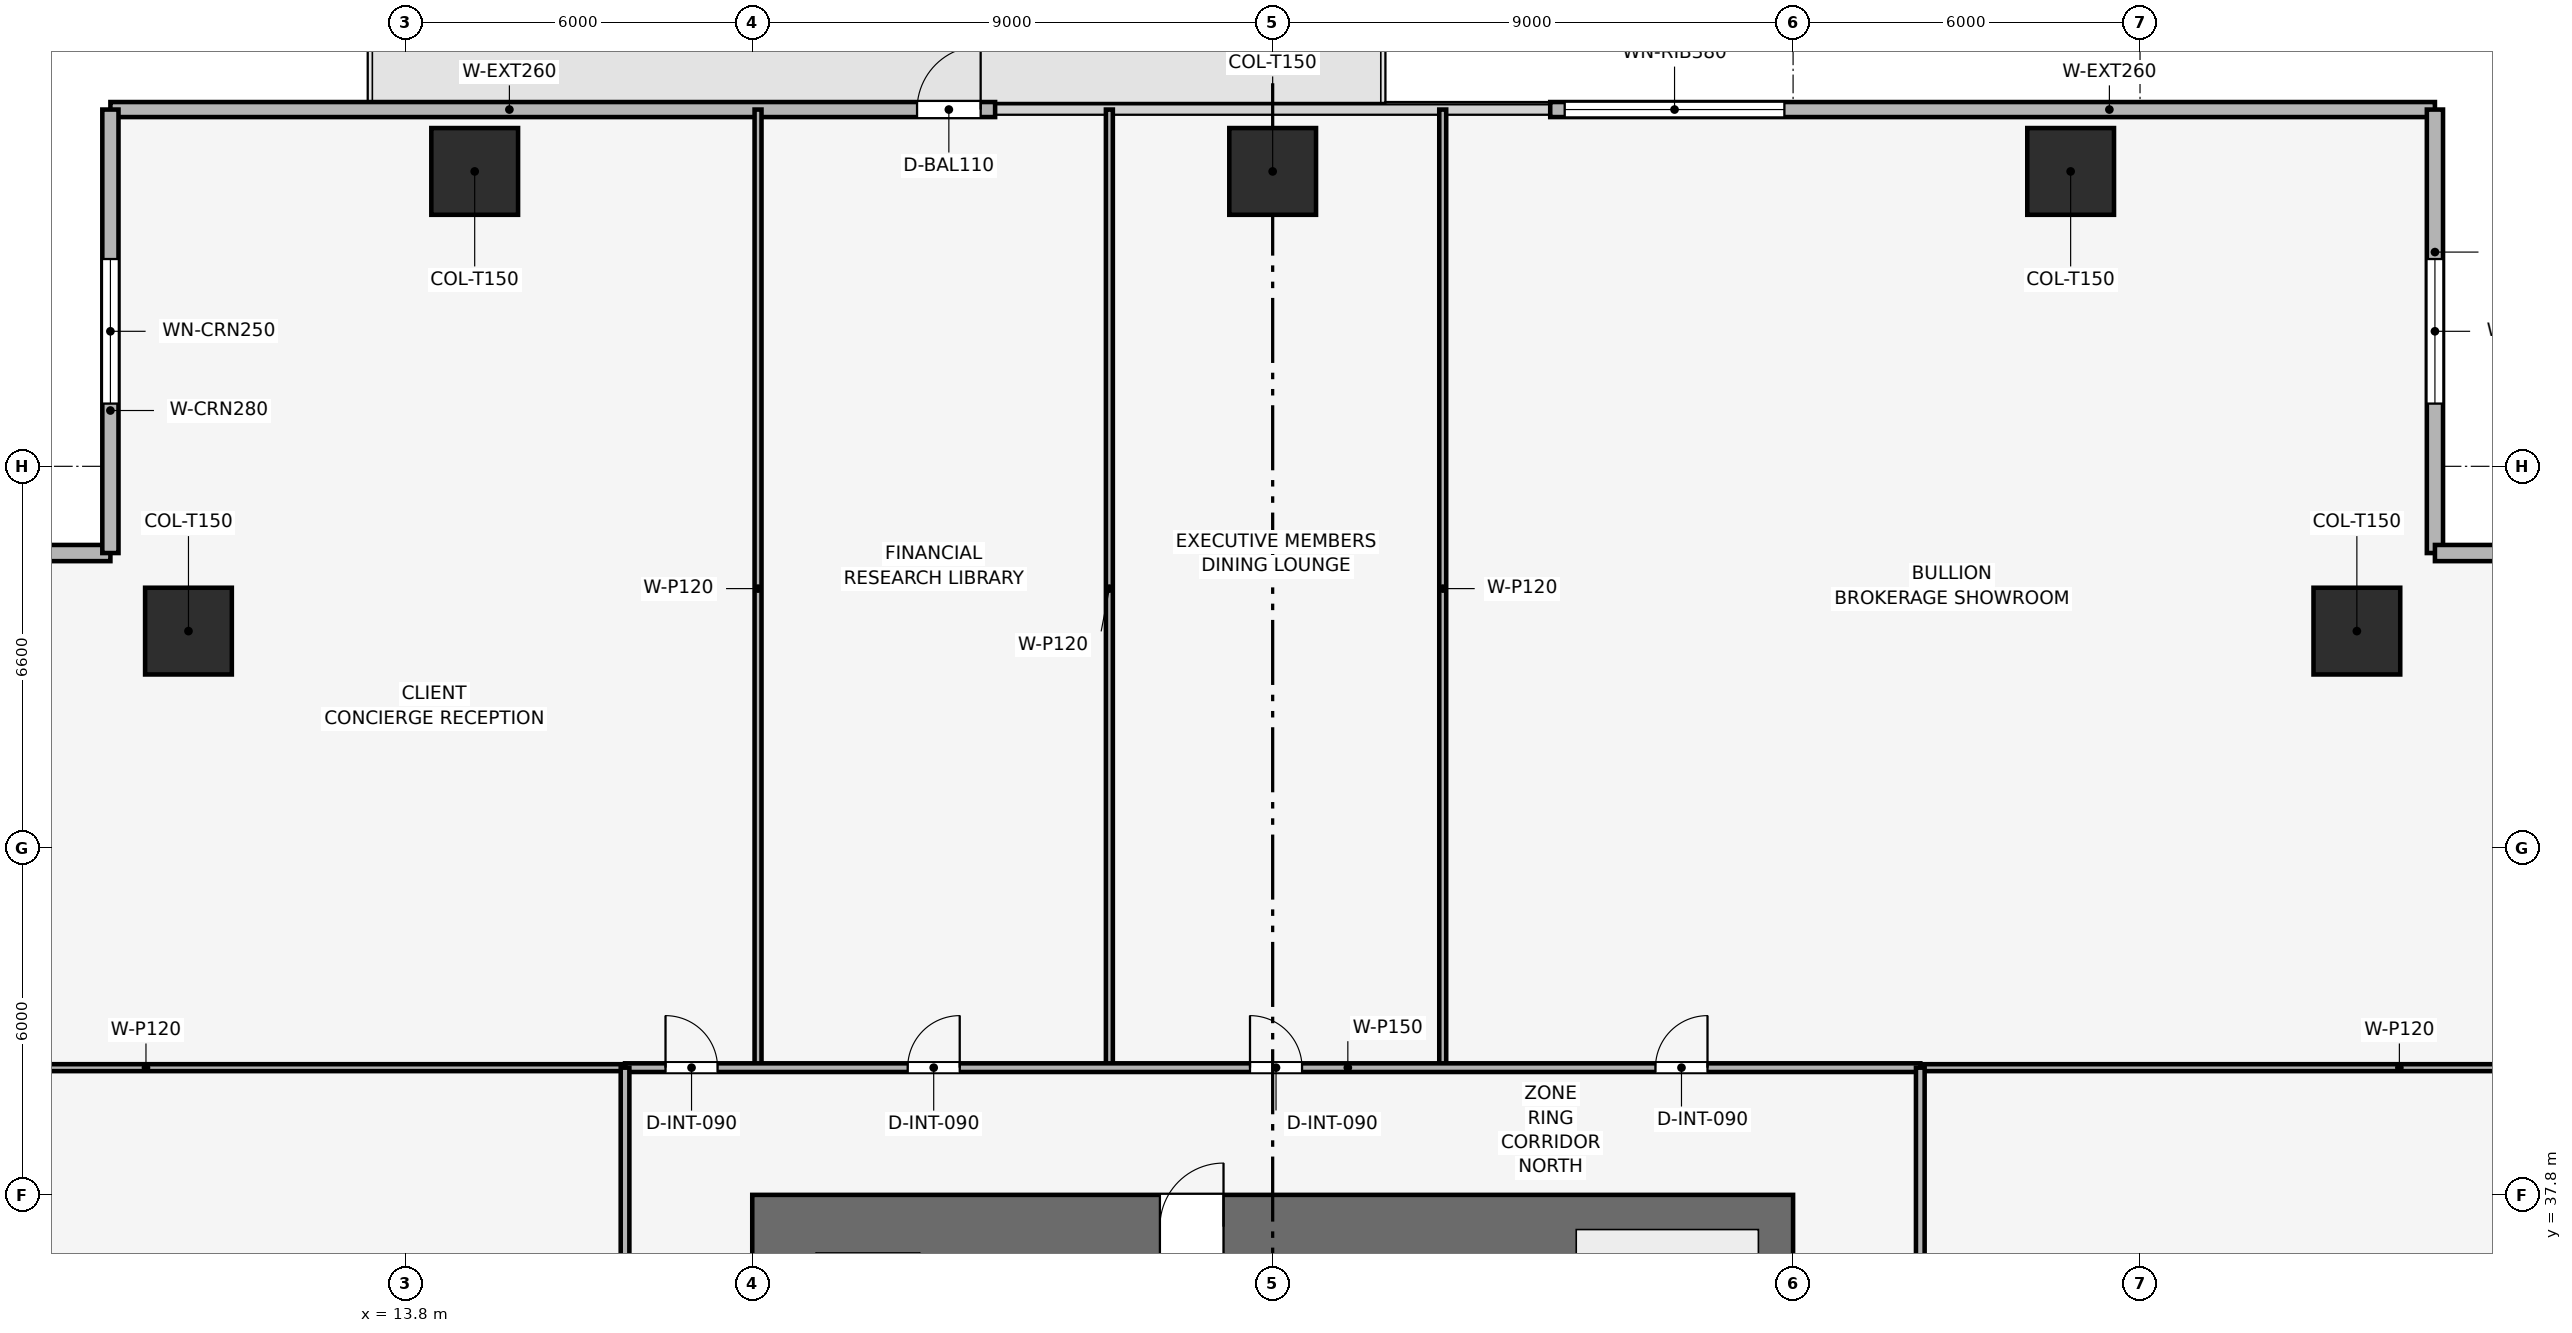
"""IFC4 building model, lengths in metres.
Left out: names, types, materials, properties, quantities, classifications, styles, units other than length and angle.
Written with IfcOpenShell. Run it as: python <this file> out.ifc"""

import sys

from ifc_helpers import new_model, si_unit, direction, frame, frame_2d, origin, origin_2d, place, context, subcontext, project, spatial, rectangle, extrude, element, fill, save


model = new_model("IFC4")
c1 = context("Model", 3, precision=1e-05, world=origin(), true_north=direction((0.0, 1.0)))
c2 = subcontext(c1, "Body", "Model", "MODEL_VIEW")
j1 = project(units=[si_unit("LENGTHUNIT", "METRE"), si_unit("PLANEANGLEUNIT", "RADIAN")], contexts=[c1])
p1 = place(None, origin())
s1 = spatial("IfcSite", under=j1, at=p1, CompositionType="ELEMENT")
p2 = place(p1, origin())
s2 = spatial("IfcBuilding", under=s1, at=p2, CompositionType="ELEMENT")
p3 = place(p2, frame((0.0, 0.0, 33.9)))
s3 = spatial("IfcBuildingStorey", under=s2, at=p3, CompositionType="ELEMENT", Elevation=33.9)
p4 = place(p3, frame((19.8, 37.25, 0.0), z_axis=(0.0, 0.0, 1.0), x_axis=(1.0, 0.0, 0.0)))
e1 = element("IfcWall", 1, at=p4, inside=s3, PredefinedType="SHEAR", context=c2, shape_type="SweptSolid", body=[
    extrude(rectangle(XDim=18.0, YDim=1.1, at=frame_2d((9.0, 0.0))), origin(), (0.0, 0.0, 1.0), 3.9),
])
p5 = place(p4, frame((7.05, 0.0, 0.0)))
e2 = element("IfcOpeningElement", 2, at=p5, cuts=e1, PredefinedType="OPENING", context=c2, shape_type="SweptSolid", body=[
    extrude(rectangle(XDim=1.1, YDim=2.15, at=frame_2d((0.55, 1.075))), frame((0.0, 0.56, 0.0), z_axis=(0.0, -1.0, 0.0), x_axis=(1.0, 0.0, 0.0)), (0.0, 0.0, 1.0), 1.12),
])
for number, where, z_axis, x_axis in (
    (3, (42.6, 55.5, 0.003), (0.0, 0.0, 1.0), (1.0, 0.0, 0.0)),
    (4, (28.8, 55.5, 0.003), (0.0, 0.0, 1.0), (1.0, 0.0, 0.0)),
    (5, (15.0, 55.5, 0.003), (0.0, 0.0, 1.0), (1.0, 0.0, 0.0)),
    (6, (47.55, 47.55, 0.003), (0.0, 0.0, 1.0), (1.0, 0.0, 0.0)),
    (7, (10.05, 47.55, 0.003), (0.0, 0.0, 1.0), (1.0, 0.0, 0.0)),
):
    element("IfcColumn", number, at=place(p3, frame(where, z_axis=z_axis, x_axis=x_axis)), inside=s3, PredefinedType="COLUMN", context=c2, shape_type="SweptSolid", body=[
        extrude(rectangle(XDim=1.5, YDim=1.5, at=origin_2d()), origin(), (0.0, 0.0, 1.0), 3.644),
    ])
p6 = place(p3, frame((8.7, 56.57, 0.0), z_axis=(0.0, 0.0, 1.0), x_axis=(1.0, 0.0, 0.0)))
e8 = element("IfcWall", 8, at=p6, inside=s3, PredefinedType="SOLIDWALL", context=c2, shape_type="SweptSolid", body=[
    extrude(rectangle(XDim=15.3, YDim=0.26, at=frame_2d((7.65, 0.0))), origin(), (0.0, 0.0, 1.0), 3.65),
])
p7 = place(p6, frame((13.95, 0.0, 0.0)))
e9 = element("IfcOpeningElement", 9, at=p7, cuts=e8, PredefinedType="OPENING", context=c2, shape_type="SweptSolid", body=[
    extrude(rectangle(XDim=1.1, YDim=2.2, at=frame_2d((0.55, 1.1))), frame((0.0, 0.14, 0.0), z_axis=(0.0, -1.0, 0.0), x_axis=(1.0, 0.0, 0.0)), (0.0, 0.0, 1.0), 0.28),
])
p8 = place(p3, frame((33.6, 56.57, 0.0), z_axis=(0.0, 0.0, 1.0), x_axis=(1.0, 0.0, 0.0)))
e10 = element("IfcWall", 10, at=p8, inside=s3, PredefinedType="SOLIDWALL", context=c2, shape_type="SweptSolid", body=[
    extrude(rectangle(XDim=15.3, YDim=0.26, at=frame_2d((7.65, 0.0))), origin(), (0.0, 0.0, 1.0), 3.65),
])
p9 = place(p8, frame((0.25, 0.0, 0.9)))
e11 = element("IfcOpeningElement", 11, at=p9, cuts=e10, PredefinedType="OPENING", context=c2, shape_type="SweptSolid", body=[
    extrude(rectangle(XDim=3.8, YDim=1.9, at=frame_2d((1.9, 0.95))), frame((0.0, 0.14, 0.0), z_axis=(0.0, -1.0, 0.0), x_axis=(1.0, 0.0, 0.0)), (0.0, 0.0, 1.0), 0.28),
])
p10 = place(p3, frame((1.03, 48.9, 0.0), z_axis=(0.0, 0.0, 1.0), x_axis=(1.0, 0.0, 0.0)))
e12 = element("IfcWall", 12, at=p10, inside=s3, PredefinedType="SOLIDWALL", context=c2, shape_type="SweptSolid", body=[
    extrude(rectangle(XDim=7.67, YDim=0.28, at=frame_2d((3.835, 0.0))), origin(), (0.0, 0.0, 1.0), 3.65),
])
p11 = place(p10, frame((2.585, 0.0, 0.9)))
e13 = element("IfcOpeningElement", 13, at=p11, cuts=e12, PredefinedType="OPENING", context=c2, shape_type="SweptSolid", body=[
    extrude(rectangle(XDim=2.5, YDim=1.9, at=frame_2d((1.25, 0.95))), frame((0.0, 0.15, 0.0), z_axis=(0.0, -1.0, 0.0), x_axis=(1.0, 0.0, 0.0)), (0.0, 0.0, 1.0), 0.3),
])
p12 = place(p3, frame((8.7, 48.9, 0.0), z_axis=(0.0, 0.0, 1.0), x_axis=(0.0, 1.0, 0.0)))
e14 = element("IfcWall", 14, at=p12, inside=s3, PredefinedType="SOLIDWALL", context=c2, shape_type="SweptSolid", body=[
    extrude(rectangle(XDim=7.67, YDim=0.28, at=frame_2d((3.835, 0.0))), origin(), (0.0, 0.0, 1.0), 3.65),
])
p13 = place(p12, frame((2.585, 0.0, 0.9)))
e15 = element("IfcOpeningElement", 15, at=p13, cuts=e14, PredefinedType="OPENING", context=c2, shape_type="SweptSolid", body=[
    extrude(rectangle(XDim=2.5, YDim=1.9, at=frame_2d((1.25, 0.95))), frame((0.0, 0.15, 0.0), z_axis=(0.0, -1.0, 0.0), x_axis=(1.0, 0.0, 0.0)), (0.0, 0.0, 1.0), 0.3),
])
p14 = place(p3, frame((48.9, 56.57, 0.0), z_axis=(0.0, 0.0, 1.0), x_axis=(0.0, -1.0, 0.0)))
e16 = element("IfcWall", 16, at=p14, inside=s3, PredefinedType="SOLIDWALL", context=c2, shape_type="SweptSolid", body=[
    extrude(rectangle(XDim=7.67, YDim=0.28, at=frame_2d((3.835, 0.0))), origin(), (0.0, 0.0, 1.0), 3.65),
])
p15 = place(p14, frame((2.585, 0.0, 0.9)))
e17 = element("IfcOpeningElement", 17, at=p15, cuts=e16, PredefinedType="OPENING", context=c2, shape_type="SweptSolid", body=[
    extrude(rectangle(XDim=2.5, YDim=1.9, at=frame_2d((1.25, 0.95))), frame((0.0, 0.15, 0.0), z_axis=(0.0, -1.0, 0.0), x_axis=(1.0, 0.0, 0.0)), (0.0, 0.0, 1.0), 0.3),
])
p16 = place(p3, frame((48.9, 48.9, 0.0), z_axis=(0.0, 0.0, 1.0), x_axis=(1.0, 0.0, 0.0)))
e18 = element("IfcWall", 18, at=p16, inside=s3, PredefinedType="SOLIDWALL", context=c2, shape_type="SweptSolid", body=[
    extrude(rectangle(XDim=7.67, YDim=0.28, at=frame_2d((3.835, 0.0))), origin(), (0.0, 0.0, 1.0), 3.65),
])
p17 = place(p16, frame((2.585, 0.0, 0.9)))
e19 = element("IfcOpeningElement", 19, at=p17, cuts=e18, PredefinedType="OPENING", context=c2, shape_type="SweptSolid", body=[
    extrude(rectangle(XDim=2.5, YDim=1.9, at=frame_2d((1.25, 0.95))), frame((0.0, 0.15, 0.0), z_axis=(0.0, -1.0, 0.0), x_axis=(1.0, 0.0, 0.0)), (0.0, 0.0, 1.0), 0.3),
])
for number, where, z_axis, x_axis in (
    (20, (19.9, 40.0, 0.0), (0.0, 0.0, 1.0), (0.0, 1.0, 0.0)),
    (21, (25.976, 40.0, 0.0), (0.0, 0.0, 1.0), (0.0, 1.0, 0.0)),
    (22, (31.741, 40.0, 0.0), (0.0, 0.0, 1.0), (0.0, 1.0, 0.0)),
    (23, (1.03, 40.0, 0.0), (0.0, 0.0, 1.0), (1.0, 0.0, 0.0)),
    (24, (40.0, 40.0, 0.0), (0.0, 0.0, 1.0), (1.0, 0.0, 0.0)),
):
    element("IfcWall", number, at=place(p3, frame(where, z_axis=z_axis, x_axis=x_axis)), inside=s3, PredefinedType="PARTITIONING", context=c2, shape_type="SweptSolid", body=[
        extrude(rectangle(XDim=16.57, YDim=0.12, at=frame_2d((8.285, 0.0))), origin(), (0.0, 0.0, 1.0), 2.935),
    ])
p18 = place(p3, frame((17.6, 40.0, 0.0), z_axis=(0.0, 0.0, 1.0), x_axis=(1.0, 0.0, 0.0)))
e25 = element("IfcWall", 25, at=p18, inside=s3, PredefinedType="PARTITIONING", context=c2, shape_type="SweptSolid", body=[
    extrude(rectangle(XDim=22.4, YDim=0.15, at=frame_2d((11.2, 0.0))), origin(), (0.0, 0.0, 1.0), 3.085),
])
p19 = place(p18, frame((0.7, 0.0, 0.0)))
e26 = element("IfcOpeningElement", 26, at=p19, cuts=e25, PredefinedType="OPENING", context=c2, shape_type="SweptSolid", body=[
    extrude(rectangle(XDim=0.9, YDim=2.1, at=frame_2d((0.45, 1.05))), frame((0.0, 0.085, 0.0), z_axis=(0.0, -1.0, 0.0), x_axis=(1.0, 0.0, 0.0)), (0.0, 0.0, 1.0), 0.17),
])
p20 = place(p18, frame((4.888, 0.0, 0.0)))
e27 = element("IfcOpeningElement", 27, at=p20, cuts=e25, PredefinedType="OPENING", context=c2, shape_type="SweptSolid", body=[
    extrude(rectangle(XDim=0.9, YDim=2.1, at=frame_2d((0.45, 1.05))), frame((0.0, 0.085, 0.0), z_axis=(0.0, -1.0, 0.0), x_axis=(1.0, 0.0, 0.0)), (0.0, 0.0, 1.0), 0.17),
])
p21 = place(p18, frame((10.808, 0.0, 0.0)))
e28 = element("IfcOpeningElement", 28, at=p21, cuts=e25, PredefinedType="OPENING", context=c2, shape_type="SweptSolid", body=[
    extrude(rectangle(XDim=0.9, YDim=2.1, at=frame_2d((0.45, 1.05))), frame((0.0, 0.085, 0.0), z_axis=(0.0, -1.0, 0.0), x_axis=(1.0, 0.0, 0.0)), (0.0, 0.0, 1.0), 0.17),
])
p22 = place(p18, frame((17.82, 0.0, 0.0)))
e29 = element("IfcOpeningElement", 29, at=p22, cuts=e25, PredefinedType="OPENING", context=c2, shape_type="SweptSolid", body=[
    extrude(rectangle(XDim=0.9, YDim=2.1, at=frame_2d((0.45, 1.05))), frame((0.0, 0.085, 0.0), z_axis=(0.0, -1.0, 0.0), x_axis=(1.0, 0.0, 0.0)), (0.0, 0.0, 1.0), 0.17),
])
p23 = place(p3, frame((17.6, 17.6, 0.0), z_axis=(0.0, 0.0, 1.0), x_axis=(0.0, 1.0, 0.0)))
e30 = element("IfcWall", 30, at=p23, inside=s3, PredefinedType="PARTITIONING", context=c2, shape_type="SweptSolid", body=[
    extrude(rectangle(XDim=22.4, YDim=0.15, at=frame_2d((11.2, 0.0))), origin(), (0.0, 0.0, 1.0), 3.085),
])
p24 = place(p23, frame((2.48, 0.0, 0.0)))
e31 = element("IfcOpeningElement", 31, at=p24, cuts=e30, PredefinedType="OPENING", context=c2, shape_type="SweptSolid", body=[
    extrude(rectangle(XDim=0.9, YDim=2.1, at=frame_2d((0.45, 1.05))), frame((0.0, 0.085, 0.0), z_axis=(0.0, -1.0, 0.0), x_axis=(1.0, 0.0, 0.0)), (0.0, 0.0, 1.0), 0.17),
])
p25 = place(p23, frame((13.68, 0.0, 0.0)))
e32 = element("IfcOpeningElement", 32, at=p25, cuts=e30, PredefinedType="OPENING", context=c2, shape_type="SweptSolid", body=[
    extrude(rectangle(XDim=0.9, YDim=2.1, at=frame_2d((0.45, 1.05))), frame((0.0, 0.085, 0.0), z_axis=(0.0, -1.0, 0.0), x_axis=(1.0, 0.0, 0.0)), (0.0, 0.0, 1.0), 0.17),
])
p26 = place(p3, frame((40.0, 17.6, 0.0), z_axis=(0.0, 0.0, 1.0), x_axis=(0.0, 1.0, 0.0)))
e33 = element("IfcWall", 33, at=p26, inside=s3, PredefinedType="PARTITIONING", context=c2, shape_type="SweptSolid", body=[
    extrude(rectangle(XDim=22.4, YDim=0.15, at=frame_2d((11.2, 0.0))), origin(), (0.0, 0.0, 1.0), 3.085),
])
p27 = place(p26, frame((0.85, 0.0, 0.0)))
e34 = element("IfcOpeningElement", 34, at=p27, cuts=e33, PredefinedType="OPENING", context=c2, shape_type="SweptSolid", body=[
    extrude(rectangle(XDim=0.9, YDim=2.1, at=frame_2d((0.45, 1.05))), frame((0.0, 0.085, 0.0), z_axis=(0.0, -1.0, 0.0), x_axis=(1.0, 0.0, 0.0)), (0.0, 0.0, 1.0), 0.17),
])
p28 = place(p26, frame((3.55, 0.0, 0.0)))
e35 = element("IfcOpeningElement", 35, at=p28, cuts=e33, PredefinedType="OPENING", context=c2, shape_type="SweptSolid", body=[
    extrude(rectangle(XDim=0.9, YDim=2.1, at=frame_2d((0.45, 1.05))), frame((0.0, 0.085, 0.0), z_axis=(0.0, -1.0, 0.0), x_axis=(1.0, 0.0, 0.0)), (0.0, 0.0, 1.0), 0.17),
])
p29 = place(p26, frame((6.45, 0.0, 0.0)))
e36 = element("IfcOpeningElement", 36, at=p29, cuts=e33, PredefinedType="OPENING", context=c2, shape_type="SweptSolid", body=[
    extrude(rectangle(XDim=0.9, YDim=2.1, at=frame_2d((0.45, 1.05))), frame((0.0, 0.085, 0.0), z_axis=(0.0, -1.0, 0.0), x_axis=(1.0, 0.0, 0.0)), (0.0, 0.0, 1.0), 0.17),
])
p30 = place(p26, frame((9.2, 0.0, 0.0)))
e37 = element("IfcOpeningElement", 37, at=p30, cuts=e33, PredefinedType="OPENING", context=c2, shape_type="SweptSolid", body=[
    extrude(rectangle(XDim=0.95, YDim=2.1, at=frame_2d((0.475, 1.05))), frame((0.0, 0.085, 0.0), z_axis=(0.0, -1.0, 0.0), x_axis=(1.0, 0.0, 0.0)), (0.0, 0.0, 1.0), 0.17),
])
p31 = place(p26, frame((16.25, 0.0, 0.0)))
e38 = element("IfcOpeningElement", 38, at=p31, cuts=e33, PredefinedType="OPENING", context=c2, shape_type="SweptSolid", body=[
    extrude(rectangle(XDim=0.9, YDim=2.1, at=frame_2d((0.45, 1.05))), frame((0.0, 0.085, 0.0), z_axis=(0.0, -1.0, 0.0), x_axis=(1.0, 0.0, 0.0)), (0.0, 0.0, 1.0), 0.17),
])
p32 = place(p7, origin())
e39 = element("IfcDoor", 39, at=p32, inside=s3, OperationType="SINGLE_SWING_RIGHT", PredefinedType="DOOR", context=c2, shape_type="SweptSolid", body=[
    extrude(rectangle(XDim=1.1, YDim=2.2, at=frame_2d((0.55, 1.1))), frame((0.0, 0.025, 0.0), z_axis=(0.0, -1.0, 0.0), x_axis=(1.0, 0.0, 0.0)), (0.0, 0.0, 1.0), 0.05),
])
fill(e9, e39)
p33 = place(p9, origin())
e40 = element("IfcWindow", 40, at=p33, inside=s3, PartitioningType="SINGLE_PANEL", PredefinedType="WINDOW", context=c2, shape_type="SweptSolid", body=[
    extrude(rectangle(XDim=3.8, YDim=1.9, at=frame_2d((1.9, 0.95))), frame((0.0, 0.03, 0.0), z_axis=(0.0, -1.0, 0.0), x_axis=(1.0, 0.0, 0.0)), (0.0, 0.0, 1.0), 0.06),
])
fill(e11, e40)
p34 = place(p13, origin())
e41 = element("IfcWindow", 41, at=p34, inside=s3, PartitioningType="SINGLE_PANEL", PredefinedType="WINDOW", context=c2, shape_type="SweptSolid", body=[
    extrude(rectangle(XDim=2.5, YDim=1.9, at=frame_2d((1.25, 0.95))), frame((0.0, 0.03, 0.0), z_axis=(0.0, -1.0, 0.0), x_axis=(1.0, 0.0, 0.0)), (0.0, 0.0, 1.0), 0.06),
])
fill(e15, e41)
p35 = place(p15, origin())
e42 = element("IfcWindow", 42, at=p35, inside=s3, PartitioningType="SINGLE_PANEL", PredefinedType="WINDOW", context=c2, shape_type="SweptSolid", body=[
    extrude(rectangle(XDim=2.5, YDim=1.9, at=frame_2d((1.25, 0.95))), frame((0.0, 0.03, 0.0), z_axis=(0.0, -1.0, 0.0), x_axis=(1.0, 0.0, 0.0)), (0.0, 0.0, 1.0), 0.06),
])
fill(e17, e42)
p36 = place(p19, origin())
e43 = element("IfcDoor", 43, at=p36, inside=s3, OperationType="SINGLE_SWING_LEFT", PredefinedType="DOOR", context=c2, shape_type="SweptSolid", body=[
    extrude(rectangle(XDim=0.9, YDim=2.1, at=frame_2d((0.45, 1.05))), frame((0.0, 0.025, 0.0), z_axis=(0.0, -1.0, 0.0), x_axis=(1.0, 0.0, 0.0)), (0.0, 0.0, 1.0), 0.05),
])
fill(e26, e43)
p37 = place(p20, origin())
e44 = element("IfcDoor", 44, at=p37, inside=s3, OperationType="SINGLE_SWING_RIGHT", PredefinedType="DOOR", context=c2, shape_type="SweptSolid", body=[
    extrude(rectangle(XDim=0.9, YDim=2.1, at=frame_2d((0.45, 1.05))), frame((0.0, 0.025, 0.0), z_axis=(0.0, -1.0, 0.0), x_axis=(1.0, 0.0, 0.0)), (0.0, 0.0, 1.0), 0.05),
])
fill(e27, e44)
p38 = place(p21, origin())
e45 = element("IfcDoor", 45, at=p38, inside=s3, OperationType="SINGLE_SWING_LEFT", PredefinedType="DOOR", context=c2, shape_type="SweptSolid", body=[
    extrude(rectangle(XDim=0.9, YDim=2.1, at=frame_2d((0.45, 1.05))), frame((0.0, 0.025, 0.0), z_axis=(0.0, -1.0, 0.0), x_axis=(1.0, 0.0, 0.0)), (0.0, 0.0, 1.0), 0.05),
])
fill(e28, e45)
p39 = place(p22, origin())
e46 = element("IfcDoor", 46, at=p39, inside=s3, OperationType="SINGLE_SWING_RIGHT", PredefinedType="DOOR", context=c2, shape_type="SweptSolid", body=[
    extrude(rectangle(XDim=0.9, YDim=2.1, at=frame_2d((0.45, 1.05))), frame((0.0, 0.025, 0.0), z_axis=(0.0, -1.0, 0.0), x_axis=(1.0, 0.0, 0.0)), (0.0, 0.0, 1.0), 0.05),
])
fill(e29, e46)
p40 = place(p5, origin())
e47 = element("IfcDoor", 47, at=p40, inside=s3, OperationType="SINGLE_SWING_RIGHT", PredefinedType="DOOR", context=c2, shape_type="SweptSolid", body=[
    extrude(rectangle(XDim=1.1, YDim=2.15, at=frame_2d((0.55, 1.075))), frame((0.0, 0.025, 0.0), z_axis=(0.0, -1.0, 0.0), x_axis=(1.0, 0.0, 0.0)), (0.0, 0.0, 1.0), 0.05),
])
fill(e2, e47)
save(model, sys.argv[1])
